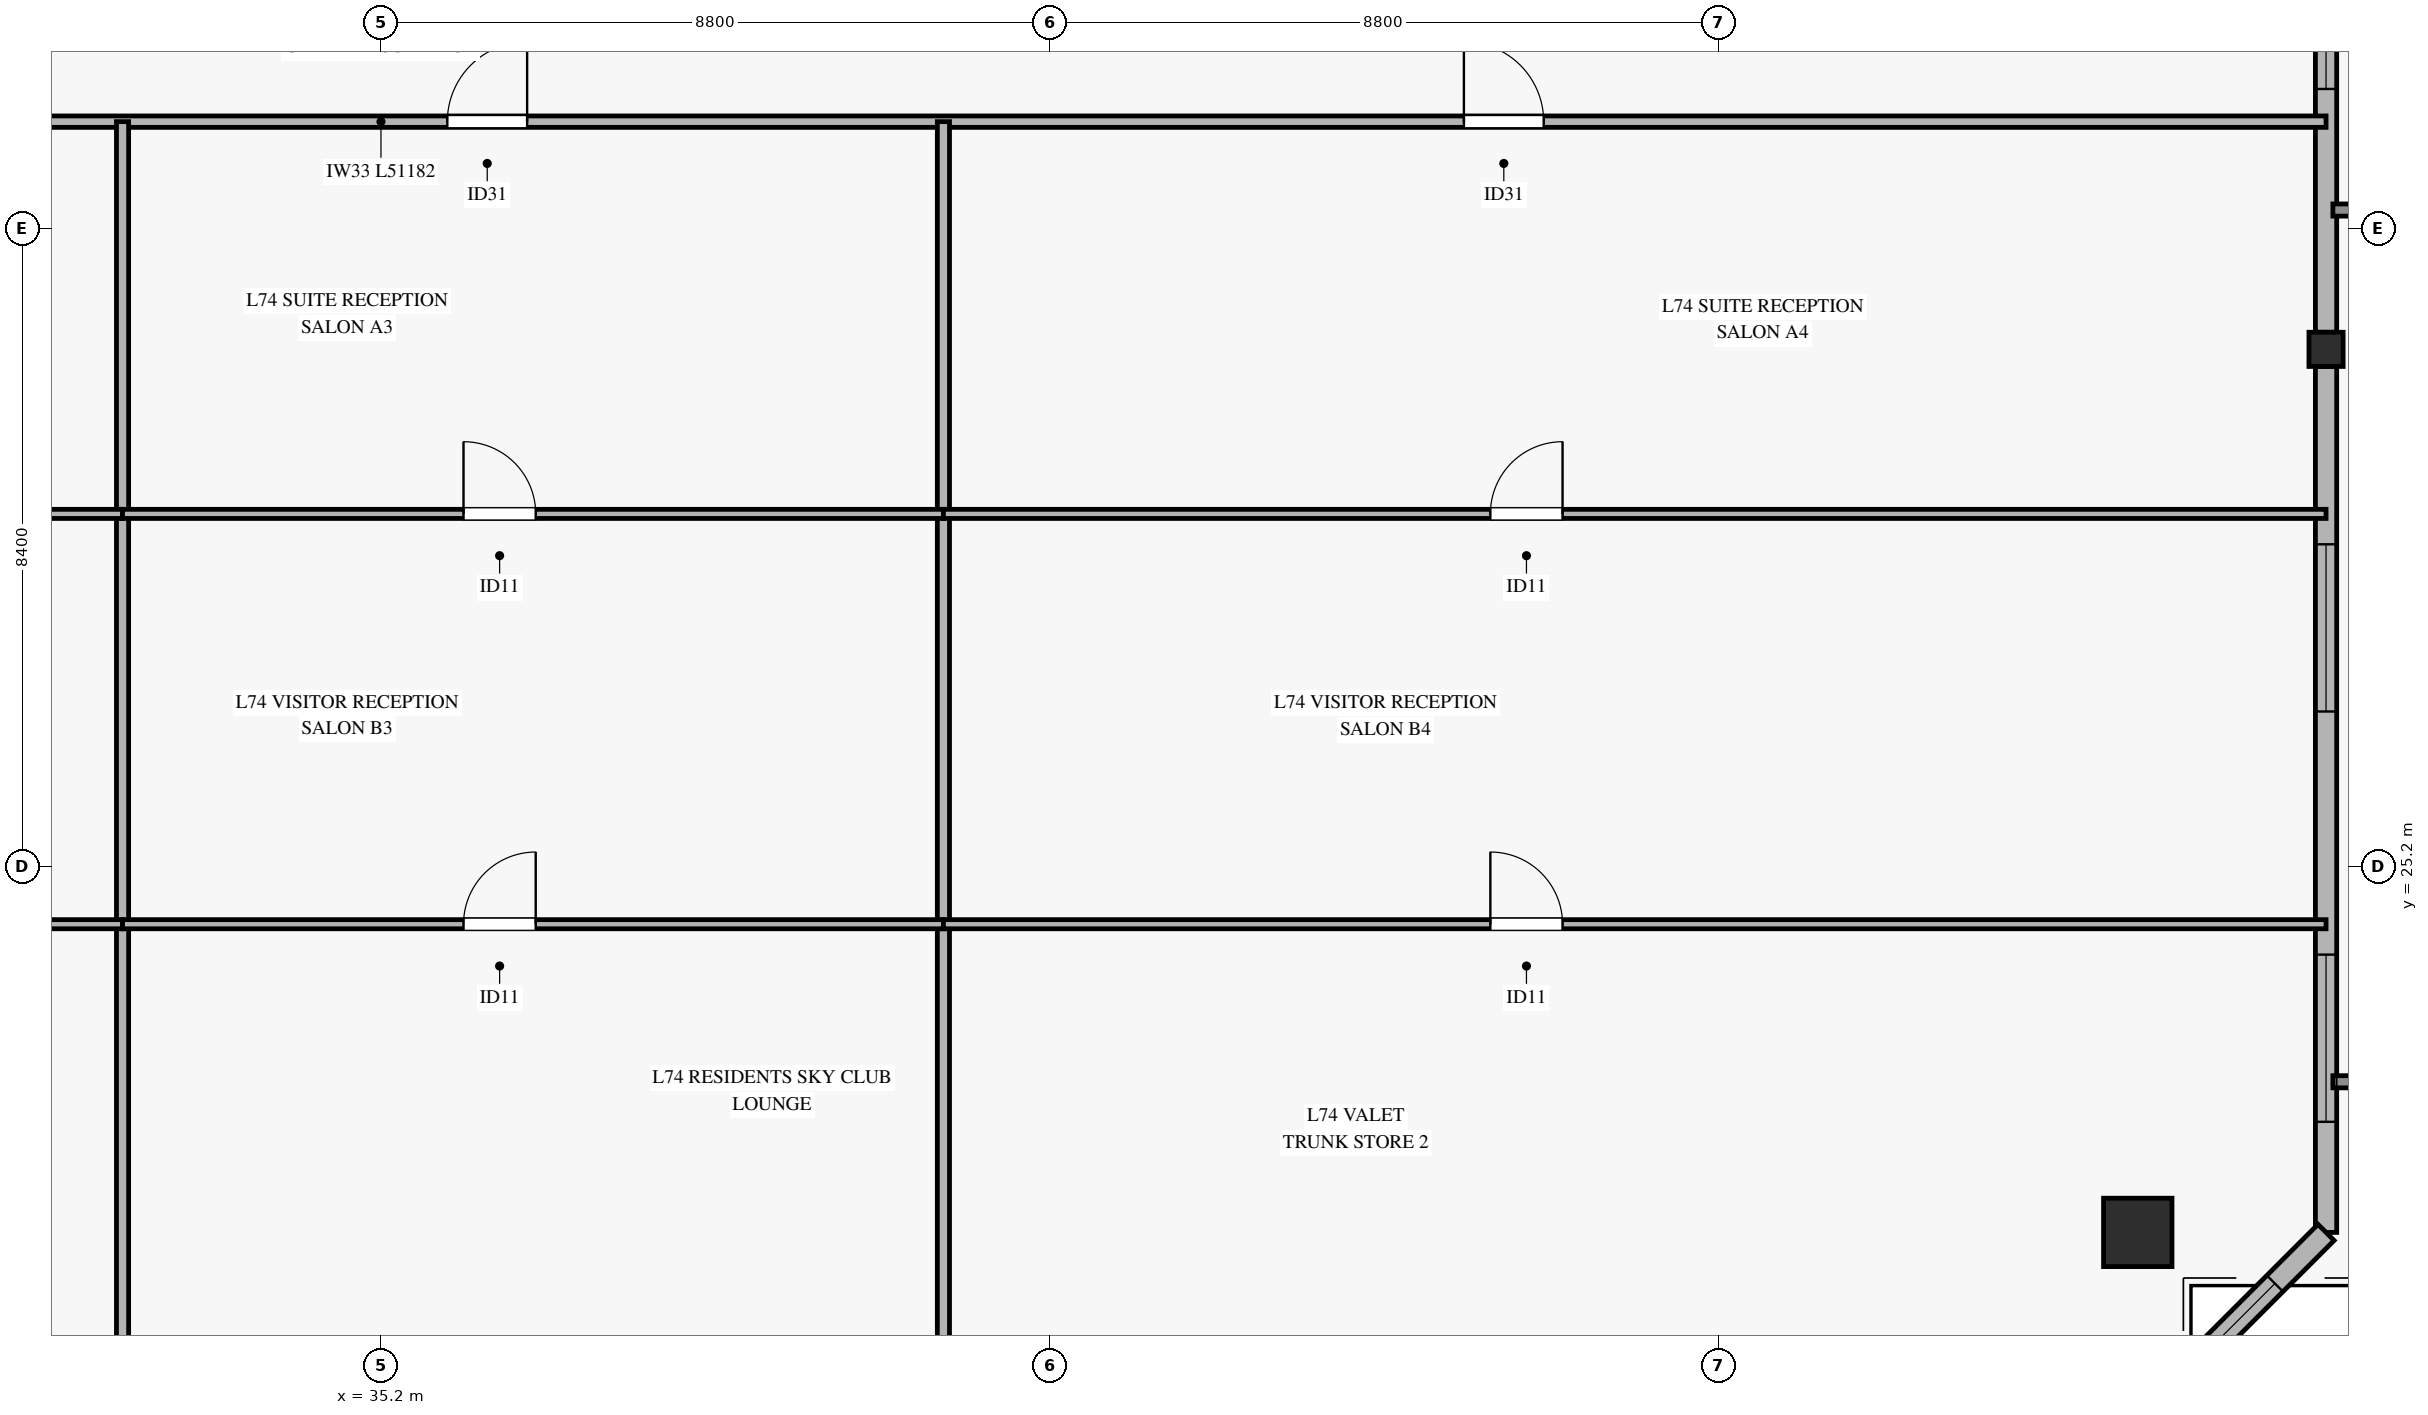
"""IFC4 building model, lengths in metres.
Left out: names, types, materials, properties, quantities, classifications, styles, units other than length and angle.
Written with IfcOpenShell. Run it as: python <this file> out.ifc"""

import sys

from ifc_helpers import new_model, si_unit, direction, frame, frame_2d, origin, origin_2d, place, context, subcontext, project, spatial, rectangle, hollow_rectangle, extrude, source, transform, mapped, element, fill, save


model = new_model("IFC4")
c1 = context("Model", 3, precision=1e-05, world=origin(), true_north=direction((0.0, 1.0)))
c2 = subcontext(c1, "Body", "Model", "MODEL_VIEW")
j1 = project(units=[si_unit("LENGTHUNIT", "METRE"), si_unit("PLANEANGLEUNIT", "RADIAN")], contexts=[c1])
p1 = place(None, origin())
s1 = spatial("IfcSite", under=j1, at=p1, CompositionType="ELEMENT")
p2 = place(p1, origin())
s2 = spatial("IfcBuilding", under=s1, at=p2, CompositionType="ELEMENT")
p3 = place(p2, frame((0.0, 0.0, 290.4)))
s3 = spatial("IfcBuildingStorey", under=s2, at=p3, CompositionType="ELEMENT", Elevation=290.4)
m1 = source(origin(), c2, "Body", "SweptSolid", [
    extrude(hollow_rectangle(XDim=0.9, YDim=0.9, WallThickness=0.04, at=origin_2d()), origin(), (0.0, 0.0, 1.0), 3.327),
])
p4 = place(p3, frame((58.314, 20.385, 0.0), z_axis=(-0.110887345502, 0.266613981607, 0.957403249117), x_axis=(-0.923324865032, -0.384019782842, 0.0)))
e1 = element("IfcColumn", 1, at=p4, inside=s3, PredefinedType="COLUMN", context=c2, shape_type="MappedRepresentation", body=[
    mapped(m1, transform((0.0, 0.0, 0.0), x_axis=(1.0, 0.0, 0.0), y_axis=(0.0, 1.0, 0.0), z_axis=(0.0, 0.0, 1.0), scale=1.0)),
])
m2 = source(origin(), c2, "Body", "SweptSolid", [
    extrude(hollow_rectangle(XDim=0.45, YDim=0.45, WallThickness=0.022, at=origin_2d()), origin(), (0.0, 0.0, 1.0), 3.319),
])
for number, where, z_axis, x_axis in (
    (2, (30.8, 17.908, 0.0), (0.0, 0.281, 0.96), (-1.0, 0.0, 0.0)),
    (3, (37.55, 17.908, 0.0), (0.0, 0.281, 0.96), (-1.0, 0.0, 0.0)),
    (4, (44.3, 17.908, 0.0), (0.0, 0.281, 0.96), (-1.0, 0.0, 0.0)),
    (5, (50.55, 17.908, 0.0), (0.0, 0.281, 0.96), (-1.0, 0.0, 0.0)),
):
    element("IfcColumn", number, at=place(p3, frame(where, z_axis=z_axis, x_axis=x_axis)), inside=s3, PredefinedType="COLUMN", context=c2, shape_type="MappedRepresentation", body=[
        mapped(m2, transform((0.0, 0.0, 0.0), x_axis=(1.0, 0.0, 0.0), y_axis=(0.0, 1.0, 0.0), z_axis=(0.0, 0.0, 1.0), scale=1.0)),
    ])
m3 = source(origin(), c2, "Body", "SweptSolid", [
    extrude(hollow_rectangle(XDim=0.45, YDim=0.45, WallThickness=0.022, at=origin_2d()), origin(), (0.0, 0.0, 1.0), 3.246),
])
p5 = place(p3, frame((60.791, 32.004, 0.0), z_axis=(-0.12787099786, 0.143892481709, 0.981297081222), x_axis=(-0.747495545809, -0.664266820635, 0.0)))
e6 = element("IfcColumn", 6, at=p5, inside=s3, PredefinedType="COLUMN", context=c2, shape_type="MappedRepresentation", body=[
    mapped(m3, transform((0.0, 0.0, 0.0), x_axis=(1.0, 0.0, 0.0), y_axis=(0.0, 1.0, 0.0), z_axis=(0.0, 0.0, 1.0), scale=1.0)),
])
p6 = place(p3, frame((60.791, 20.385, 0.0), z_axis=(0.0, 0.0, 1.0), x_axis=(0.0, 1.0, 0.0)))
e7 = element("IfcWall", 7, at=p6, inside=s3, PredefinedType="SOLIDWALL", context=c2, shape_type="SweptSolid", body=[
    extrude(rectangle(XDim=11.394, YDim=0.28, at=frame_2d((5.697, 0.0))), origin(), (0.0, 0.0, 1.0), 2.815),
])
p7 = place(p6, frame((1.455, 0.0, 0.45)))
e8 = element("IfcOpeningElement", 8, at=p7, cuts=e7, PredefinedType="OPENING", context=c2, shape_type="SweptSolid", body=[
    extrude(rectangle(XDim=2.2, YDim=2.1, at=frame_2d((1.1, 1.05))), frame((0.0, 0.15, 0.0), z_axis=(0.0, -1.0, 0.0), x_axis=(1.0, 0.0, 0.0)), (0.0, 0.0, 1.0), 0.3),
])
p8 = place(p6, frame((6.854, 0.0, 0.45)))
e9 = element("IfcOpeningElement", 9, at=p8, cuts=e7, PredefinedType="OPENING", context=c2, shape_type="SweptSolid", body=[
    extrude(rectangle(XDim=2.2, YDim=2.1, at=frame_2d((1.1, 1.05))), frame((0.0, 0.15, 0.0), z_axis=(0.0, -1.0, 0.0), x_axis=(1.0, 0.0, 0.0)), (0.0, 0.0, 1.0), 0.3),
])
p9 = place(p3, frame((60.791, 32.229, 0.0), z_axis=(0.0, 0.0, 1.0), x_axis=(0.0, 1.0, 0.0)))
e10 = element("IfcWall", 10, at=p9, inside=s3, PredefinedType="SOLIDWALL", context=c2, shape_type="SweptSolid", body=[
    extrude(rectangle(XDim=11.393, YDim=0.28, at=frame_2d((5.697, 0.0))), origin(), (0.0, 0.0, 1.0), 2.815),
])
p10 = place(p9, frame((3.201, 0.0, 0.45)))
e11 = element("IfcOpeningElement", 11, at=p10, cuts=e10, PredefinedType="OPENING", context=c2, shape_type="SweptSolid", body=[
    extrude(rectangle(XDim=1.6, YDim=2.0, at=frame_2d((0.8, 1.0))), frame((0.0, 0.15, 0.0), z_axis=(0.0, -1.0, 0.0), x_axis=(1.0, 0.0, 0.0)), (0.0, 0.0, 1.0), 0.3),
])
p11 = place(p3, frame((58.314, 17.908, 0.0), z_axis=(0.0, 0.0, 1.0), x_axis=(0.707106781187, 0.707106781187, 0.0)))
e12 = element("IfcWall", 12, at=p11, inside=s3, PredefinedType="SOLIDWALL", context=c2, shape_type="SweptSolid", body=[
    extrude(rectangle(XDim=3.503, YDim=0.3, at=frame_2d((1.751, 0.0))), origin(), (0.0, 0.0, 1.0), 2.815),
])
p12 = place(p11, frame((0.952, 0.0, 0.45)))
e13 = element("IfcOpeningElement", 13, at=p12, cuts=e12, PredefinedType="OPENING", context=c2, shape_type="SweptSolid", body=[
    extrude(rectangle(XDim=1.6, YDim=2.0, at=frame_2d((0.8, 1.0))), frame((0.0, 0.16, 0.0), z_axis=(0.0, -1.0, 0.0), x_axis=(1.0, 0.0, 0.0)), (0.0, 0.0, 1.0), 0.32),
])
p13 = place(p3, frame((9.609, 35.0, 0.0), z_axis=(0.0, 0.0, 1.0), x_axis=(1.0, 0.0, 0.0)))
e14 = element("IfcWall", 14, at=p13, inside=s3, PredefinedType="PARTITIONING", context=c2, shape_type="SweptSolid", body=[
    extrude(rectangle(XDim=51.182, YDim=0.15, at=frame_2d((25.591, 0.0))), origin(), (0.0, 0.0, 1.0), 2.47),
])
p14 = place(p13, frame((4.841, 0.0, 0.0)))
e15 = element("IfcOpeningElement", 15, at=p14, cuts=e14, PredefinedType="OPENING", context=c2, shape_type="SweptSolid", body=[
    extrude(rectangle(XDim=1.05, YDim=2.15, at=frame_2d((0.525, 1.075))), frame((0.0, 0.085, 0.0), z_axis=(0.0, -1.0, 0.0), x_axis=(1.0, 0.0, 0.0)), (0.0, 0.0, 1.0), 0.17),
])
p15 = place(p13, frame((15.602, 0.0, 0.0)))
e16 = element("IfcOpeningElement", 16, at=p15, cuts=e14, PredefinedType="OPENING", context=c2, shape_type="SweptSolid", body=[
    extrude(rectangle(XDim=1.05, YDim=2.15, at=frame_2d((0.525, 1.075))), frame((0.0, 0.085, 0.0), z_axis=(0.0, -1.0, 0.0), x_axis=(1.0, 0.0, 0.0)), (0.0, 0.0, 1.0), 0.17),
])
p16 = place(p13, frame((26.464, 0.0, 0.0)))
e17 = element("IfcOpeningElement", 17, at=p16, cuts=e14, PredefinedType="OPENING", context=c2, shape_type="SweptSolid", body=[
    extrude(rectangle(XDim=1.05, YDim=2.15, at=frame_2d((0.525, 1.075))), frame((0.0, 0.085, 0.0), z_axis=(0.0, -1.0, 0.0), x_axis=(1.0, 0.0, 0.0)), (0.0, 0.0, 1.0), 0.17),
])
p17 = place(p13, frame((39.839, 0.0, 0.0)))
e18 = element("IfcOpeningElement", 18, at=p17, cuts=e14, PredefinedType="OPENING", context=c2, shape_type="SweptSolid", body=[
    extrude(rectangle(XDim=1.05, YDim=2.15, at=frame_2d((0.525, 1.075))), frame((0.0, 0.085, 0.0), z_axis=(0.0, -1.0, 0.0), x_axis=(1.0, 0.0, 0.0)), (0.0, 0.0, 1.0), 0.17),
])
for number, where, z_axis, x_axis in (
    (19, (31.8, 17.908, 0.0), (0.0, 0.0, 1.0), (0.0, 1.0, 0.0)),
    (20, (42.6, 17.908, 0.0), (0.0, 0.0, 1.0), (0.0, 1.0, 0.0)),
):
    element("IfcWall", number, at=place(p3, frame(where, z_axis=z_axis, x_axis=x_axis)), inside=s3, PredefinedType="PARTITIONING", context=c2, shape_type="SweptSolid", body=[
        extrude(rectangle(XDim=17.092, YDim=0.16, at=frame_2d((8.546, 0.0))), origin(), (0.0, 0.0, 1.0), 2.77),
    ])
p18 = place(p3, frame((20.9, 24.44, 0.0), z_axis=(0.0, 0.0, 1.0), x_axis=(1.0, 0.0, 0.0)))
e21 = element("IfcWall", 21, at=p18, inside=s3, PredefinedType="PARTITIONING", context=c2, shape_type="SweptSolid", body=[
    extrude(rectangle(XDim=10.9, YDim=0.12, at=frame_2d((5.45, 0.0))), origin(), (0.0, 0.0, 1.0), 2.47),
])
p19 = place(p18, frame((4.526, 0.0, 0.0)))
e22 = element("IfcOpeningElement", 22, at=p19, cuts=e21, PredefinedType="OPENING", context=c2, shape_type="SweptSolid", body=[
    extrude(rectangle(XDim=0.95, YDim=2.1, at=frame_2d((0.475, 1.05))), frame((0.0, 0.07, 0.0), z_axis=(0.0, -1.0, 0.0), x_axis=(1.0, 0.0, 0.0)), (0.0, 0.0, 1.0), 0.14),
])
p20 = place(p3, frame((20.9, 29.839, 0.0), z_axis=(0.0, 0.0, 1.0), x_axis=(1.0, 0.0, 0.0)))
e23 = element("IfcWall", 23, at=p20, inside=s3, PredefinedType="PARTITIONING", context=c2, shape_type="SweptSolid", body=[
    extrude(rectangle(XDim=10.9, YDim=0.12, at=frame_2d((5.45, 0.0))), origin(), (0.0, 0.0, 1.0), 2.47),
])
p21 = place(p20, frame((4.526, 0.0, 0.0)))
e24 = element("IfcOpeningElement", 24, at=p21, cuts=e23, PredefinedType="OPENING", context=c2, shape_type="SweptSolid", body=[
    extrude(rectangle(XDim=0.95, YDim=2.1, at=frame_2d((0.475, 1.05))), frame((0.0, 0.07, 0.0), z_axis=(0.0, -1.0, 0.0), x_axis=(1.0, 0.0, 0.0)), (0.0, 0.0, 1.0), 0.14),
])
p22 = place(p3, frame((31.8, 24.44, 0.0), z_axis=(0.0, 0.0, 1.0), x_axis=(1.0, 0.0, 0.0)))
e25 = element("IfcWall", 25, at=p22, inside=s3, PredefinedType="PARTITIONING", context=c2, shape_type="SweptSolid", body=[
    extrude(rectangle(XDim=10.8, YDim=0.12, at=frame_2d((5.4, 0.0))), origin(), (0.0, 0.0, 1.0), 2.47),
])
p23 = place(p22, frame((4.486, 0.0, 0.0)))
e26 = element("IfcOpeningElement", 26, at=p23, cuts=e25, PredefinedType="OPENING", context=c2, shape_type="SweptSolid", body=[
    extrude(rectangle(XDim=0.95, YDim=2.1, at=frame_2d((0.475, 1.05))), frame((0.0, 0.07, 0.0), z_axis=(0.0, -1.0, 0.0), x_axis=(1.0, 0.0, 0.0)), (0.0, 0.0, 1.0), 0.14),
])
p24 = place(p3, frame((31.8, 29.839, 0.0), z_axis=(0.0, 0.0, 1.0), x_axis=(1.0, 0.0, 0.0)))
e27 = element("IfcWall", 27, at=p24, inside=s3, PredefinedType="PARTITIONING", context=c2, shape_type="SweptSolid", body=[
    extrude(rectangle(XDim=10.8, YDim=0.12, at=frame_2d((5.4, 0.0))), origin(), (0.0, 0.0, 1.0), 2.47),
])
p25 = place(p24, frame((4.486, 0.0, 0.0)))
e28 = element("IfcOpeningElement", 28, at=p25, cuts=e27, PredefinedType="OPENING", context=c2, shape_type="SweptSolid", body=[
    extrude(rectangle(XDim=0.95, YDim=2.1, at=frame_2d((0.475, 1.05))), frame((0.0, 0.07, 0.0), z_axis=(0.0, -1.0, 0.0), x_axis=(1.0, 0.0, 0.0)), (0.0, 0.0, 1.0), 0.14),
])
p26 = place(p3, frame((42.6, 24.44, 0.0), z_axis=(0.0, 0.0, 1.0), x_axis=(1.0, 0.0, 0.0)))
e29 = element("IfcWall", 29, at=p26, inside=s3, PredefinedType="PARTITIONING", context=c2, shape_type="SweptSolid", body=[
    extrude(rectangle(XDim=18.191, YDim=0.12, at=frame_2d((9.095, 0.0))), origin(), (0.0, 0.0, 1.0), 2.47),
])
p27 = place(p26, frame((7.196, 0.0, 0.0)))
e30 = element("IfcOpeningElement", 30, at=p27, cuts=e29, PredefinedType="OPENING", context=c2, shape_type="SweptSolid", body=[
    extrude(rectangle(XDim=0.95, YDim=2.1, at=frame_2d((0.475, 1.05))), frame((0.0, 0.07, 0.0), z_axis=(0.0, -1.0, 0.0), x_axis=(1.0, 0.0, 0.0)), (0.0, 0.0, 1.0), 0.14),
])
p28 = place(p3, frame((42.6, 29.839, 0.0), z_axis=(0.0, 0.0, 1.0), x_axis=(1.0, 0.0, 0.0)))
e31 = element("IfcWall", 31, at=p28, inside=s3, PredefinedType="PARTITIONING", context=c2, shape_type="SweptSolid", body=[
    extrude(rectangle(XDim=18.191, YDim=0.12, at=frame_2d((9.095, 0.0))), origin(), (0.0, 0.0, 1.0), 2.47),
])
p29 = place(p28, frame((7.196, 0.0, 0.0)))
e32 = element("IfcOpeningElement", 32, at=p29, cuts=e31, PredefinedType="OPENING", context=c2, shape_type="SweptSolid", body=[
    extrude(rectangle(XDim=0.95, YDim=2.1, at=frame_2d((0.475, 1.05))), frame((0.0, 0.07, 0.0), z_axis=(0.0, -1.0, 0.0), x_axis=(1.0, 0.0, 0.0)), (0.0, 0.0, 1.0), 0.14),
])
m4 = source(origin(), c2, "Body", "SweptSolid", [
    extrude(rectangle(XDim=2.2, YDim=2.1, at=frame_2d((1.1, 1.05))), frame((0.0, 0.03, 0.0), z_axis=(0.0, -1.0, 0.0), x_axis=(1.0, 0.0, 0.0)), (0.0, 0.0, 1.0), 0.06),
])
p30 = place(p7, origin())
e33 = element("IfcWindow", 33, at=p30, inside=s3, PartitioningType="SINGLE_PANEL", PredefinedType="WINDOW", context=c2, shape_type="MappedRepresentation", body=[
    mapped(m4, transform((0.0, 0.0, 0.0), x_axis=(1.0, 0.0, 0.0), y_axis=(0.0, 1.0, 0.0), z_axis=(0.0, 0.0, 1.0), scale=1.0)),
])
fill(e8, e33)
p31 = place(p8, origin())
e34 = element("IfcWindow", 34, at=p31, inside=s3, PartitioningType="SINGLE_PANEL", PredefinedType="WINDOW", context=c2, shape_type="MappedRepresentation", body=[
    mapped(m4, transform((0.0, 0.0, 0.0), x_axis=(1.0, 0.0, 0.0), y_axis=(0.0, 1.0, 0.0), z_axis=(0.0, 0.0, 1.0), scale=1.0)),
])
fill(e9, e34)
m5 = source(origin(), c2, "Body", "SweptSolid", [
    extrude(rectangle(XDim=1.6, YDim=2.0, at=frame_2d((0.8, 1.0))), frame((0.0, 0.03, 0.0), z_axis=(0.0, -1.0, 0.0), x_axis=(1.0, 0.0, 0.0)), (0.0, 0.0, 1.0), 0.06),
])
p32 = place(p10, origin())
e35 = element("IfcWindow", 35, at=p32, inside=s3, PartitioningType="SINGLE_PANEL", PredefinedType="WINDOW", context=c2, shape_type="MappedRepresentation", body=[
    mapped(m5, transform((0.0, 0.0, 0.0), x_axis=(1.0, 0.0, 0.0), y_axis=(0.0, 1.0, 0.0), z_axis=(0.0, 0.0, 1.0), scale=1.0)),
])
fill(e11, e35)
p33 = place(p12, origin())
e36 = element("IfcWindow", 36, at=p33, inside=s3, PartitioningType="SINGLE_PANEL", PredefinedType="WINDOW", context=c2, shape_type="MappedRepresentation", body=[
    mapped(m5, transform((0.0, 0.0, 0.0), x_axis=(1.0, 0.0, 0.0), y_axis=(0.0, 1.0, 0.0), z_axis=(0.0, 0.0, 1.0), scale=1.0)),
])
fill(e13, e36)
m6 = source(origin(), c2, "Body", "SweptSolid", [
    extrude(rectangle(XDim=1.05, YDim=2.15, at=frame_2d((0.525, 1.075))), frame((0.0, 0.025, 0.0), z_axis=(0.0, -1.0, 0.0), x_axis=(1.0, 0.0, 0.0)), (0.0, 0.0, 1.0), 0.05),
])
p34 = place(p16, origin())
e37 = element("IfcDoor", 37, at=p34, inside=s3, OperationType="SINGLE_SWING_RIGHT", PredefinedType="DOOR", context=c2, shape_type="MappedRepresentation", body=[
    mapped(m6, transform((0.0, 0.0, 0.0), x_axis=(1.0, 0.0, 0.0), y_axis=(0.0, 1.0, 0.0), z_axis=(0.0, 0.0, 1.0), scale=1.0)),
])
fill(e17, e37)
m7 = source(origin(), c2, "Body", "SweptSolid", [
    extrude(rectangle(XDim=0.95, YDim=2.1, at=frame_2d((0.475, 1.05))), frame((0.0, 0.025, 0.0), z_axis=(0.0, -1.0, 0.0), x_axis=(1.0, 0.0, 0.0)), (0.0, 0.0, 1.0), 0.05),
])
p35 = place(p25, origin())
e38 = element("IfcDoor", 38, at=p35, inside=s3, OperationType="SINGLE_SWING_LEFT", PredefinedType="DOOR", context=c2, shape_type="MappedRepresentation", body=[
    mapped(m7, transform((0.0, 0.0, 0.0), x_axis=(1.0, 0.0, 0.0), y_axis=(0.0, 1.0, 0.0), z_axis=(0.0, 0.0, 1.0), scale=1.0)),
])
fill(e28, e38)
p36 = place(p23, origin())
e39 = element("IfcDoor", 39, at=p36, inside=s3, OperationType="SINGLE_SWING_RIGHT", PredefinedType="DOOR", context=c2, shape_type="MappedRepresentation", body=[
    mapped(m7, transform((0.0, 0.0, 0.0), x_axis=(1.0, 0.0, 0.0), y_axis=(0.0, 1.0, 0.0), z_axis=(0.0, 0.0, 1.0), scale=1.0)),
])
fill(e26, e39)
p37 = place(p17, origin())
e40 = element("IfcDoor", 40, at=p37, inside=s3, OperationType="SINGLE_SWING_LEFT", PredefinedType="DOOR", context=c2, shape_type="MappedRepresentation", body=[
    mapped(m6, transform((0.0, 0.0, 0.0), x_axis=(1.0, 0.0, 0.0), y_axis=(0.0, 1.0, 0.0), z_axis=(0.0, 0.0, 1.0), scale=1.0)),
])
fill(e18, e40)
p38 = place(p29, origin())
e41 = element("IfcDoor", 41, at=p38, inside=s3, OperationType="SINGLE_SWING_RIGHT", PredefinedType="DOOR", context=c2, shape_type="MappedRepresentation", body=[
    mapped(m7, transform((0.0, 0.0, 0.0), x_axis=(1.0, 0.0, 0.0), y_axis=(0.0, 1.0, 0.0), z_axis=(0.0, 0.0, 1.0), scale=1.0)),
])
fill(e32, e41)
p39 = place(p27, origin())
e42 = element("IfcDoor", 42, at=p39, inside=s3, OperationType="SINGLE_SWING_LEFT", PredefinedType="DOOR", context=c2, shape_type="MappedRepresentation", body=[
    mapped(m7, transform((0.0, 0.0, 0.0), x_axis=(1.0, 0.0, 0.0), y_axis=(0.0, 1.0, 0.0), z_axis=(0.0, 0.0, 1.0), scale=1.0)),
])
fill(e30, e42)
save(model, sys.argv[1])
